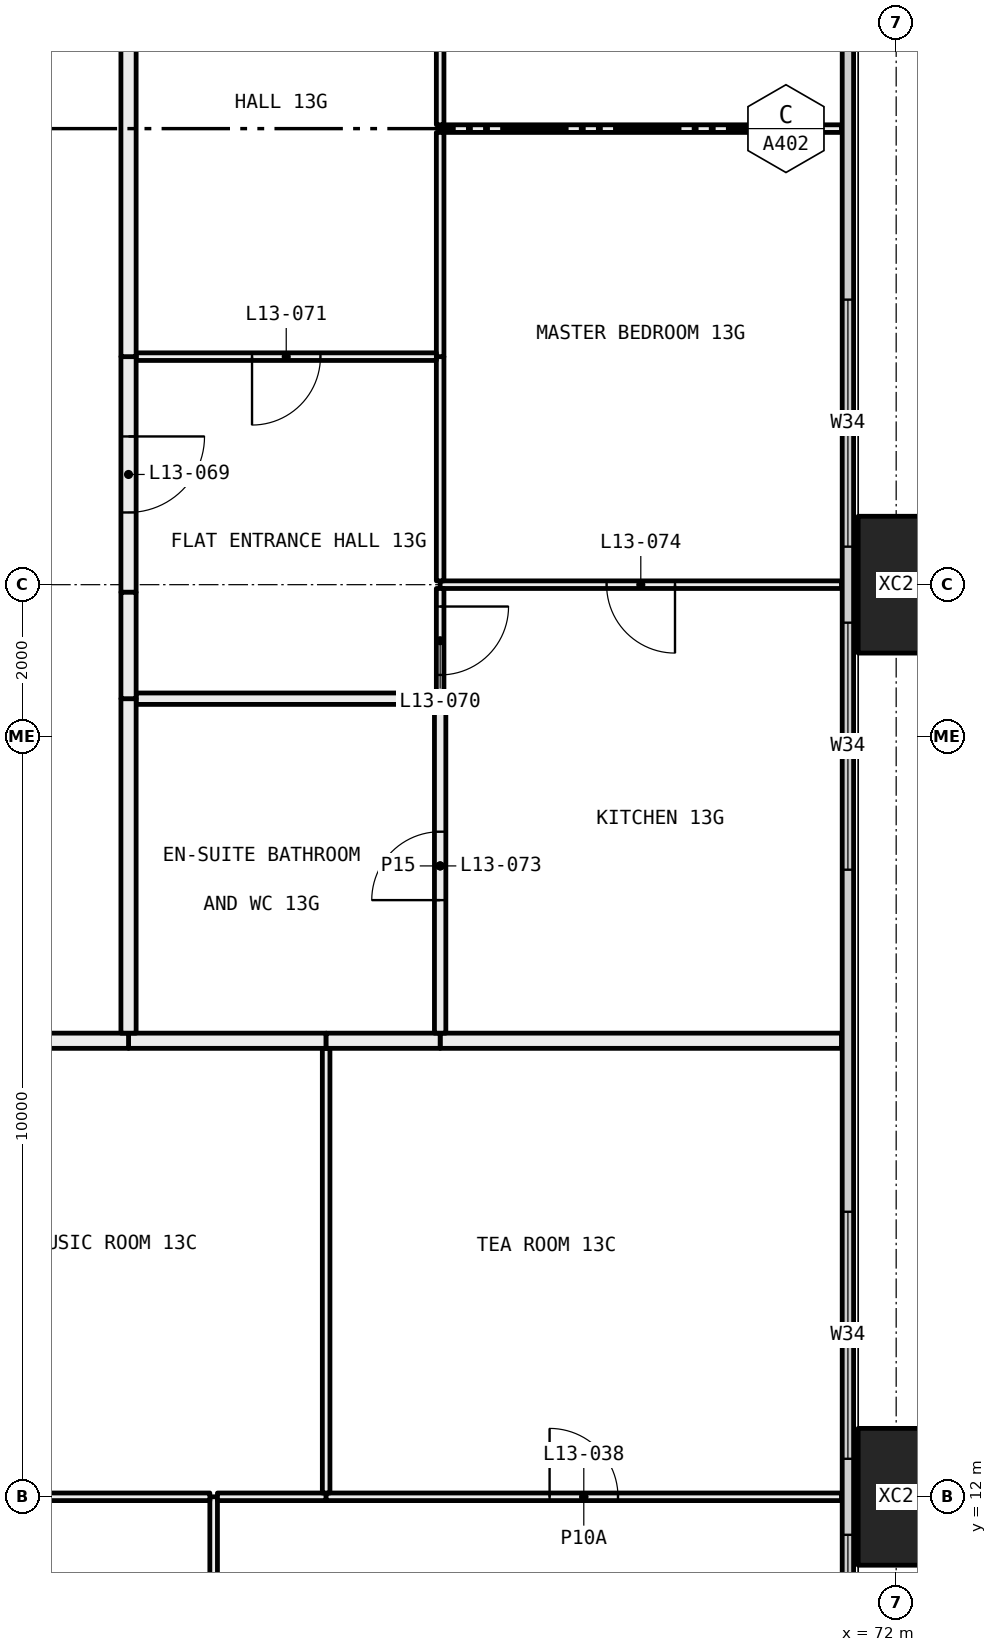
"""IFC4 building model, lengths in metres.
Left out: names, types, materials, properties, quantities, classifications, styles, units other than length and angle.
Written with IfcOpenShell. Run it as: python <this file> out.ifc"""

import sys

from ifc_helpers import new_model, si_unit, direction, frame, frame_2d, origin, origin_2d, place, context, subcontext, project, spatial, rectangle, hollow_rectangle, extrude, element, fill, save


model = new_model("IFC4")
c1 = context("Model", 3, precision=1e-05, world=origin(), true_north=direction((0.0, 1.0)))
c2 = subcontext(c1, "Body", "Model", "MODEL_VIEW")
j1 = project(units=[si_unit("LENGTHUNIT", "METRE"), si_unit("PLANEANGLEUNIT", "RADIAN")], contexts=[c1])
p1 = place(None, origin())
s1 = spatial("IfcSite", under=j1, at=p1, CompositionType="ELEMENT")
p2 = place(p1, origin())
s2 = spatial("IfcBuilding", under=s1, at=p2, CompositionType="ELEMENT")
p3 = place(p2, frame((0.0, 0.0, 57.6)))
s3 = spatial("IfcBuildingStorey", under=s2, at=p3, CompositionType="ELEMENT", Elevation=57.6)
for number, where, z_axis, x_axis in (
    (1, (72.0, 12.0, -0.4), (0.0, 0.0, 1.0), (0.0, 1.0, 0.0)),
    (2, (72.0, 24.0, -0.4), (0.0, 0.0, 1.0), (0.0, 1.0, 0.0)),
):
    element("IfcColumn", number, at=place(p3, frame(where, z_axis=z_axis, x_axis=x_axis)), inside=s3, PredefinedType="COLUMN", context=c2, shape_type="SweptSolid", body=[
        extrude(hollow_rectangle(XDim=1.8, YDim=1.0, WallThickness=0.07, at=origin_2d()), origin(), (0.0, 0.0, 1.0), 3.45),
    ])
p4 = place(p3, frame((71.365, 6.71, 0.0), z_axis=(0.0, 0.0, 1.0), x_axis=(0.0, 1.0, 0.0)))
e3 = element("IfcWall", 3, at=p4, inside=s3, PredefinedType="ELEMENTEDWALL", context=c2, shape_type="SweptSolid", body=[
    extrude(rectangle(XDim=34.58, YDim=0.15, at=frame_2d((17.29, 0.0))), origin(), (0.0, 0.0, 1.0), 3.05),
])
p5 = place(p4, frame((0.29, 0.0, 0.45)))
e4 = element("IfcOpeningElement", 4, at=p5, cuts=e3, PredefinedType="OPENING", context=c2, shape_type="SweptSolid", body=[
    extrude(rectangle(XDim=4.5, YDim=2.55, at=frame_2d((2.25, 1.275))), frame((0.0, 0.085, 0.0), z_axis=(0.0, -1.0, 0.0), x_axis=(1.0, 0.0, 0.0)), (0.0, 0.0, 1.0), 0.17),
])
p6 = place(p4, frame((5.79, 0.0, 0.45)))
e5 = element("IfcOpeningElement", 5, at=p6, cuts=e3, PredefinedType="OPENING", context=c2, shape_type="SweptSolid", body=[
    extrude(rectangle(XDim=3.25, YDim=2.55, at=frame_2d((1.625, 1.275))), frame((0.0, 0.085, 0.0), z_axis=(0.0, -1.0, 0.0), x_axis=(1.0, 0.0, 0.0)), (0.0, 0.0, 1.0), 0.17),
])
p7 = place(p4, frame((13.54, 0.0, 0.45)))
e6 = element("IfcOpeningElement", 6, at=p7, cuts=e3, PredefinedType="OPENING", context=c2, shape_type="SweptSolid", body=[
    extrude(rectangle(XDim=3.25, YDim=2.55, at=frame_2d((1.625, 1.275))), frame((0.0, 0.085, 0.0), z_axis=(0.0, -1.0, 0.0), x_axis=(1.0, 0.0, 0.0)), (0.0, 0.0, 1.0), 0.17),
])
p8 = place(p4, frame((17.79, 0.0, 0.45)))
e7 = element("IfcOpeningElement", 7, at=p8, cuts=e3, PredefinedType="OPENING", context=c2, shape_type="SweptSolid", body=[
    extrude(rectangle(XDim=3.25, YDim=2.55, at=frame_2d((1.625, 1.275))), frame((0.0, 0.085, 0.0), z_axis=(0.0, -1.0, 0.0), x_axis=(1.0, 0.0, 0.0)), (0.0, 0.0, 1.0), 0.17),
])
p9 = place(p4, frame((26.79, 0.0, 0.45)))
e8 = element("IfcOpeningElement", 8, at=p9, cuts=e3, PredefinedType="OPENING", context=c2, shape_type="SweptSolid", body=[
    extrude(rectangle(XDim=2.0, YDim=2.55, at=frame_2d((1.0, 1.275))), frame((0.0, 0.085, 0.0), z_axis=(0.0, -1.0, 0.0), x_axis=(1.0, 0.0, 0.0)), (0.0, 0.0, 1.0), 0.17),
])
p10 = place(p4, frame((29.79, 0.0, 0.45)))
e9 = element("IfcOpeningElement", 9, at=p10, cuts=e3, PredefinedType="OPENING", context=c2, shape_type="SweptSolid", body=[
    extrude(rectangle(XDim=4.5, YDim=2.55, at=frame_2d((2.25, 1.275))), frame((0.0, 0.085, 0.0), z_axis=(0.0, -1.0, 0.0), x_axis=(1.0, 0.0, 0.0)), (0.0, 0.0, 1.0), 0.17),
])
p11 = place(p3, frame((63.02, 6.05, 0.0), z_axis=(0.0, 0.0, 1.0), x_axis=(0.0, 1.0, 0.0)))
e10 = element("IfcWall", 10, at=p11, inside=s3, PredefinedType="PARTITIONING", context=c2, shape_type="SweptSolid", body=[
    extrude(rectangle(XDim=5.95, YDim=0.1, at=frame_2d((2.975, 0.0))), origin(), (0.0, 0.0, 1.0), 2.45),
])
p12 = place(p11, frame((2.525, 0.0, 0.0)))
e11 = element("IfcOpeningElement", 11, at=p12, cuts=e10, PredefinedType="OPENING", context=c2, shape_type="SweptSolid", body=[
    extrude(rectangle(XDim=0.9, YDim=2.1, at=frame_2d((0.45, 1.05))), frame((0.0, 0.06, 0.0), z_axis=(0.0, -1.0, 0.0), x_axis=(1.0, 0.0, 0.0)), (0.0, 0.0, 1.0), 0.12),
])
p13 = place(p3, frame((62.97, 12.0, 0.0), z_axis=(0.0, 0.0, 1.0), x_axis=(-1.0, 0.0, 0.0)))
e12 = element("IfcWall", 12, at=p13, inside=s3, PredefinedType="PARTITIONING", context=c2, shape_type="SweptSolid", body=[
    extrude(rectangle(XDim=2.17, YDim=0.1, at=frame_2d((1.085, 0.0))), origin(), (0.0, 0.0, 1.0), 2.45),
])
p14 = place(p3, frame((64.5, 12.0, 0.0), z_axis=(0.0, 0.0, 1.0), x_axis=(-1.0, 0.0, 0.0)))
e13 = element("IfcWall", 13, at=p14, inside=s3, PredefinedType="PARTITIONING", context=c2, shape_type="SweptSolid", body=[
    extrude(rectangle(XDim=1.43, YDim=0.1, at=frame_2d((0.715, 0.0))), origin(), (0.0, 0.0, 1.0), 2.45),
])
p15 = place(p3, frame((71.28, 12.0, 0.0), z_axis=(0.0, 0.0, 1.0), x_axis=(-1.0, 0.0, 0.0)))
e14 = element("IfcWall", 14, at=p15, inside=s3, PredefinedType="PARTITIONING", context=c2, shape_type="SweptSolid", body=[
    extrude(rectangle(XDim=6.78, YDim=0.1, at=frame_2d((3.39, 0.0))), origin(), (0.0, 0.0, 1.0), 2.45),
])
p16 = place(p15, frame((2.94, 0.0, 0.0)))
e15 = element("IfcOpeningElement", 15, at=p16, cuts=e14, PredefinedType="OPENING", context=c2, shape_type="SweptSolid", body=[
    extrude(rectangle(XDim=0.9, YDim=2.1, at=frame_2d((0.45, 1.05))), frame((0.0, 0.06, 0.0), z_axis=(0.0, -1.0, 0.0), x_axis=(1.0, 0.0, 0.0)), (0.0, 0.0, 1.0), 0.12),
])
p17 = place(p3, frame((64.5, 12.05, 0.0), z_axis=(0.0, 0.0, 1.0), x_axis=(0.0, 1.0, 0.0)))
e16 = element("IfcWall", 16, at=p17, inside=s3, PredefinedType="PARTITIONING", context=c2, shape_type="SweptSolid", body=[
    extrude(rectangle(XDim=5.85, YDim=0.1, at=frame_2d((2.925, 0.0))), origin(), (0.0, 0.0, 1.0), 2.45),
])
p18 = place(p3, frame((64.5, 18.0, 0.0), z_axis=(0.0, 0.0, 1.0), x_axis=(-1.0, 0.0, 0.0)))
e17 = element("IfcWall", 17, at=p18, inside=s3, PredefinedType="PARTITIONING", context=c2, shape_type="SweptSolid", body=[
    extrude(rectangle(XDim=2.6, YDim=0.2, at=frame_2d((1.3, 0.0))), origin(), (0.0, 0.0, 1.0), 3.05),
])
p19 = place(p3, frame((61.9, 18.0, 0.0), z_axis=(0.0, 0.0, 1.0), x_axis=(-1.0, 0.0, 0.0)))
e18 = element("IfcWall", 18, at=p19, inside=s3, PredefinedType="PARTITIONING", context=c2, shape_type="SweptSolid", body=[
    extrude(rectangle(XDim=4.9, YDim=0.2, at=frame_2d((2.45, 0.0))), origin(), (0.0, 0.0, 1.0), 3.05),
])
p20 = place(p3, frame((71.28, 18.0, 0.0), z_axis=(0.0, 0.0, 1.0), x_axis=(-1.0, 0.0, 0.0)))
e19 = element("IfcWall", 19, at=p20, inside=s3, PredefinedType="PARTITIONING", context=c2, shape_type="SweptSolid", body=[
    extrude(rectangle(XDim=5.28, YDim=0.2, at=frame_2d((2.64, 0.0))), origin(), (0.0, 0.0, 1.0), 3.05),
])
p21 = place(p3, frame((66.0, 18.0, 0.0), z_axis=(0.0, 0.0, 1.0), x_axis=(-1.0, 0.0, 0.0)))
e20 = element("IfcWall", 20, at=p21, inside=s3, PredefinedType="PARTITIONING", context=c2, shape_type="SweptSolid", body=[
    extrude(rectangle(XDim=1.5, YDim=0.2, at=frame_2d((0.75, 0.0))), origin(), (0.0, 0.0, 1.0), 3.05),
])
p22 = place(p3, frame((71.28, 24.0, 0.0), z_axis=(0.0, 0.0, 1.0), x_axis=(-1.0, 0.0, 0.0)))
e21 = element("IfcWall", 21, at=p22, inside=s3, PredefinedType="PARTITIONING", context=c2, shape_type="SweptSolid", body=[
    extrude(rectangle(XDim=5.28, YDim=0.1, at=frame_2d((2.64, 0.0))), origin(), (0.0, 0.0, 1.0), 2.45),
])
p23 = place(p22, frame((2.19, 0.0, 0.0)))
e22 = element("IfcOpeningElement", 22, at=p23, cuts=e21, PredefinedType="OPENING", context=c2, shape_type="SweptSolid", body=[
    extrude(rectangle(XDim=0.9, YDim=2.1, at=frame_2d((0.45, 1.05))), frame((0.0, 0.06, 0.0), z_axis=(0.0, -1.0, 0.0), x_axis=(1.0, 0.0, 0.0)), (0.0, 0.0, 1.0), 0.12),
])
p24 = place(p3, frame((66.0, 22.5, 0.0), z_axis=(0.0, 0.0, 1.0), x_axis=(0.0, -1.0, 0.0)))
e23 = element("IfcWall", 23, at=p24, inside=s3, PredefinedType="PARTITIONING", context=c2, shape_type="SweptSolid", body=[
    extrude(rectangle(XDim=4.4, YDim=0.15, at=frame_2d((2.2, 0.0))), origin(), (0.0, 0.0, 1.0), 3.05),
])
p25 = place(p24, frame((1.75, 0.0, 0.0)))
e24 = element("IfcOpeningElement", 24, at=p25, cuts=e23, PredefinedType="OPENING", context=c2, shape_type="SweptSolid", body=[
    extrude(rectangle(XDim=0.9, YDim=2.1, at=frame_2d((0.45, 1.05))), frame((0.0, 0.085, 0.0), z_axis=(0.0, -1.0, 0.0), x_axis=(1.0, 0.0, 0.0)), (0.0, 0.0, 1.0), 0.17),
])
p26 = place(p3, frame((66.0, 23.95, 0.0), z_axis=(0.0, 0.0, 1.0), x_axis=(0.0, -1.0, 0.0)))
e25 = element("IfcWall", 25, at=p26, inside=s3, PredefinedType="PARTITIONING", context=c2, shape_type="SweptSolid", body=[
    extrude(rectangle(XDim=1.375, YDim=0.1, at=frame_2d((0.688, 0.0))), origin(), (0.0, 0.0, 1.0), 2.45),
])
p27 = place(p26, frame((0.238, 0.0, 0.0)))
e26 = element("IfcOpeningElement", 26, at=p27, cuts=e25, PredefinedType="OPENING", context=c2, shape_type="SweptSolid", body=[
    extrude(rectangle(XDim=0.9, YDim=2.1, at=frame_2d((0.45, 1.05))), frame((0.0, 0.06, 0.0), z_axis=(0.0, -1.0, 0.0), x_axis=(1.0, 0.0, 0.0)), (0.0, 0.0, 1.0), 0.12),
])
p28 = place(p3, frame((71.28, 30.0, 0.0), z_axis=(0.0, 0.0, 1.0), x_axis=(-1.0, 0.0, 0.0)))
e27 = element("IfcWall", 27, at=p28, inside=s3, PredefinedType="PARTITIONING", context=c2, shape_type="SweptSolid", body=[
    extrude(rectangle(XDim=5.28, YDim=0.1, at=frame_2d((2.64, 0.0))), origin(), (0.0, 0.0, 1.0), 3.05),
])
p29 = place(p3, frame((66.0, 27.0, 0.0), z_axis=(0.0, 0.0, 1.0), x_axis=(0.0, -1.0, 0.0)))
e28 = element("IfcWall", 28, at=p29, inside=s3, PredefinedType="PARTITIONING", context=c2, shape_type="SweptSolid", body=[
    extrude(rectangle(XDim=2.95, YDim=0.1, at=frame_2d((1.475, 0.0))), origin(), (0.0, 0.0, 1.0), 2.45),
])
p30 = place(p3, frame((66.0, 29.95, 0.0), z_axis=(0.0, 0.0, 1.0), x_axis=(0.0, -1.0, 0.0)))
e29 = element("IfcWall", 29, at=p30, inside=s3, PredefinedType="PARTITIONING", context=c2, shape_type="SweptSolid", body=[
    extrude(rectangle(XDim=2.95, YDim=0.1, at=frame_2d((1.475, 0.0))), origin(), (0.0, 0.0, 1.0), 3.05),
])
p31 = place(p3, frame((66.0, 35.9, 0.0), z_axis=(0.0, 0.0, 1.0), x_axis=(0.0, -1.0, 0.0)))
e30 = element("IfcWall", 30, at=p31, inside=s3, PredefinedType="PARTITIONING", context=c2, shape_type="SweptSolid", body=[
    extrude(rectangle(XDim=5.85, YDim=0.1, at=frame_2d((2.925, 0.0))), origin(), (0.0, 0.0, 1.0), 3.05),
])
p32 = place(p31, frame((2.475, 0.0, 0.0)))
e31 = element("IfcOpeningElement", 31, at=p32, cuts=e30, PredefinedType="OPENING", context=c2, shape_type="SweptSolid", body=[
    extrude(rectangle(XDim=0.9, YDim=2.1, at=frame_2d((0.45, 1.05))), frame((0.0, 0.06, 0.0), z_axis=(0.0, -1.0, 0.0), x_axis=(1.0, 0.0, 0.0)), (0.0, 0.0, 1.0), 0.12),
])
p33 = place(p3, frame((65.925, 22.5, 0.0), z_axis=(0.0, 0.0, 1.0), x_axis=(-1.0, 0.0, 0.0)))
e32 = element("IfcWall", 32, at=p33, inside=s3, PredefinedType="PARTITIONING", context=c2, shape_type="SweptSolid", body=[
    extrude(rectangle(XDim=3.925, YDim=0.15, at=frame_2d((1.962, 0.0))), origin(), (0.0, 0.0, 1.0), 3.05),
])
p34 = place(p3, frame((61.9, 22.5, 0.0), z_axis=(0.0, 0.0, 1.0), x_axis=(0.0, -1.0, 0.0)))
e33 = element("IfcWall", 33, at=p34, inside=s3, PredefinedType="PARTITIONING", context=c2, shape_type="SweptSolid", body=[
    extrude(rectangle(XDim=4.4, YDim=0.2, at=frame_2d((2.2, 0.0))), origin(), (0.0, 0.0, 1.0), 3.05),
])
p35 = place(p3, frame((65.95, 27.0, 0.0), z_axis=(0.0, 0.0, 1.0), x_axis=(-1.0, 0.0, 0.0)))
e34 = element("IfcWall", 34, at=p35, inside=s3, PredefinedType="PARTITIONING", context=c2, shape_type="SweptSolid", body=[
    extrude(rectangle(XDim=3.95, YDim=0.1, at=frame_2d((1.975, 0.0))), origin(), (0.0, 0.0, 1.0), 3.05),
])
p36 = place(p35, frame((1.525, 0.0, 0.0)))
e35 = element("IfcOpeningElement", 35, at=p36, cuts=e34, PredefinedType="OPENING", context=c2, shape_type="SweptSolid", body=[
    extrude(rectangle(XDim=0.9, YDim=2.1, at=frame_2d((0.45, 1.05))), frame((0.0, 0.06, 0.0), z_axis=(0.0, -1.0, 0.0), x_axis=(1.0, 0.0, 0.0)), (0.0, 0.0, 1.0), 0.12),
])
p37 = place(p3, frame((61.9, 27.0, 0.0), z_axis=(0.0, 0.0, 1.0), x_axis=(0.0, -1.0, 0.0)))
e36 = element("IfcWall", 36, at=p37, inside=s3, PredefinedType="PARTITIONING", context=c2, shape_type="SweptSolid", body=[
    extrude(rectangle(XDim=3.1, YDim=0.2, at=frame_2d((1.55, 0.0))), origin(), (0.0, 0.0, 1.0), 2.45),
])
p38 = place(p37, frame((1.05, 0.0, 0.0)))
e37 = element("IfcOpeningElement", 37, at=p38, cuts=e36, PredefinedType="OPENING", context=c2, shape_type="SweptSolid", body=[
    extrude(rectangle(XDim=1.0, YDim=2.1, at=frame_2d((0.5, 1.05))), frame((0.0, 0.11, 0.0), z_axis=(0.0, -1.0, 0.0), x_axis=(1.0, 0.0, 0.0)), (0.0, 0.0, 1.0), 0.22),
])
p39 = place(p3, frame((61.9, 23.9, 0.0), z_axis=(0.0, 0.0, 1.0), x_axis=(0.0, -1.0, 0.0)))
e38 = element("IfcWall", 38, at=p39, inside=s3, PredefinedType="PARTITIONING", context=c2, shape_type="SweptSolid", body=[
    extrude(rectangle(XDim=1.4, YDim=0.2, at=frame_2d((0.7, 0.0))), origin(), (0.0, 0.0, 1.0), 3.05),
])
p40 = place(p3, frame((61.9, 35.9, 0.0), z_axis=(0.0, 0.0, 1.0), x_axis=(0.0, -1.0, 0.0)))
e39 = element("IfcWall", 39, at=p40, inside=s3, PredefinedType="PARTITIONING", context=c2, shape_type="SweptSolid", body=[
    extrude(rectangle(XDim=8.9, YDim=0.2, at=frame_2d((4.45, 0.0))), origin(), (0.0, 0.0, 1.0), 3.05),
])
p41 = place(p5, origin())
e40 = element("IfcWindow", 40, at=p41, inside=s3, PartitioningType="SINGLE_PANEL", PredefinedType="WINDOW", context=c2, shape_type="SweptSolid", body=[
    extrude(rectangle(XDim=4.5, YDim=2.55, at=frame_2d((2.25, 1.275))), frame((0.0, 0.03, 0.0), z_axis=(0.0, -1.0, 0.0), x_axis=(1.0, 0.0, 0.0)), (0.0, 0.0, 1.0), 0.06),
])
fill(e4, e40)
p42 = place(p6, origin())
e41 = element("IfcWindow", 41, at=p42, inside=s3, PartitioningType="SINGLE_PANEL", PredefinedType="WINDOW", context=c2, shape_type="SweptSolid", body=[
    extrude(rectangle(XDim=3.25, YDim=2.55, at=frame_2d((1.625, 1.275))), frame((0.0, 0.03, 0.0), z_axis=(0.0, -1.0, 0.0), x_axis=(1.0, 0.0, 0.0)), (0.0, 0.0, 1.0), 0.06),
])
fill(e5, e41)
p43 = place(p7, origin())
e42 = element("IfcWindow", 42, at=p43, inside=s3, PartitioningType="SINGLE_PANEL", PredefinedType="WINDOW", context=c2, shape_type="SweptSolid", body=[
    extrude(rectangle(XDim=3.25, YDim=2.55, at=frame_2d((1.625, 1.275))), frame((0.0, 0.03, 0.0), z_axis=(0.0, -1.0, 0.0), x_axis=(1.0, 0.0, 0.0)), (0.0, 0.0, 1.0), 0.06),
])
fill(e6, e42)
p44 = place(p8, origin())
e43 = element("IfcWindow", 43, at=p44, inside=s3, PartitioningType="SINGLE_PANEL", PredefinedType="WINDOW", context=c2, shape_type="SweptSolid", body=[
    extrude(rectangle(XDim=3.25, YDim=2.55, at=frame_2d((1.625, 1.275))), frame((0.0, 0.03, 0.0), z_axis=(0.0, -1.0, 0.0), x_axis=(1.0, 0.0, 0.0)), (0.0, 0.0, 1.0), 0.06),
])
fill(e7, e43)
p45 = place(p16, frame((0.9, 0.0, 0.0), x_axis=(-1.0, 0.0, 0.0)))
e44 = element("IfcDoor", 44, at=p45, inside=s3, OperationType="SINGLE_SWING_RIGHT", PredefinedType="DOOR", context=c2, shape_type="SweptSolid", body=[
    extrude(rectangle(XDim=0.9, YDim=2.1, at=frame_2d((0.45, 1.05))), frame((0.0, 0.025, 0.0), z_axis=(0.0, -1.0, 0.0), x_axis=(1.0, 0.0, 0.0)), (0.0, 0.0, 1.0), 0.05),
])
fill(e15, e44)
p46 = place(p38, origin())
e45 = element("IfcDoor", 45, at=p46, inside=s3, OperationType="SINGLE_SWING_RIGHT", PredefinedType="DOOR", context=c2, shape_type="SweptSolid", body=[
    extrude(rectangle(XDim=1.0, YDim=2.1, at=frame_2d((0.5, 1.05))), frame((0.0, 0.025, 0.0), z_axis=(0.0, -1.0, 0.0), x_axis=(1.0, 0.0, 0.0)), (0.0, 0.0, 1.0), 0.05),
])
fill(e37, e45)
p47 = place(p27, origin())
e46 = element("IfcDoor", 46, at=p47, inside=s3, OperationType="SINGLE_SWING_RIGHT", PredefinedType="DOOR", context=c2, shape_type="SweptSolid", body=[
    extrude(rectangle(XDim=0.9, YDim=2.1, at=frame_2d((0.45, 1.05))), frame((0.0, 0.025, 0.0), z_axis=(0.0, -1.0, 0.0), x_axis=(1.0, 0.0, 0.0)), (0.0, 0.0, 1.0), 0.05),
])
fill(e26, e46)
p48 = place(p36, origin())
e47 = element("IfcDoor", 47, at=p48, inside=s3, OperationType="SINGLE_SWING_LEFT", PredefinedType="DOOR", context=c2, shape_type="SweptSolid", body=[
    extrude(rectangle(XDim=0.9, YDim=2.1, at=frame_2d((0.45, 1.05))), frame((0.0, 0.025, 0.0), z_axis=(0.0, -1.0, 0.0), x_axis=(1.0, 0.0, 0.0)), (0.0, 0.0, 1.0), 0.05),
])
fill(e35, e47)
p49 = place(p25, frame((0.9, 0.0, 0.0), x_axis=(-1.0, 0.0, 0.0)))
e48 = element("IfcDoor", 48, at=p49, inside=s3, OperationType="SINGLE_SWING_RIGHT", PredefinedType="DOOR", context=c2, shape_type="SweptSolid", body=[
    extrude(rectangle(XDim=0.9, YDim=2.1, at=frame_2d((0.45, 1.05))), frame((0.0, 0.025, 0.0), z_axis=(0.0, -1.0, 0.0), x_axis=(1.0, 0.0, 0.0)), (0.0, 0.0, 1.0), 0.05),
])
fill(e24, e48)
p50 = place(p23, origin())
e49 = element("IfcDoor", 49, at=p50, inside=s3, OperationType="SINGLE_SWING_RIGHT", PredefinedType="DOOR", context=c2, shape_type="SweptSolid", body=[
    extrude(rectangle(XDim=0.9, YDim=2.1, at=frame_2d((0.45, 1.05))), frame((0.0, 0.025, 0.0), z_axis=(0.0, -1.0, 0.0), x_axis=(1.0, 0.0, 0.0)), (0.0, 0.0, 1.0), 0.05),
])
fill(e22, e49)
save(model, sys.argv[1])
